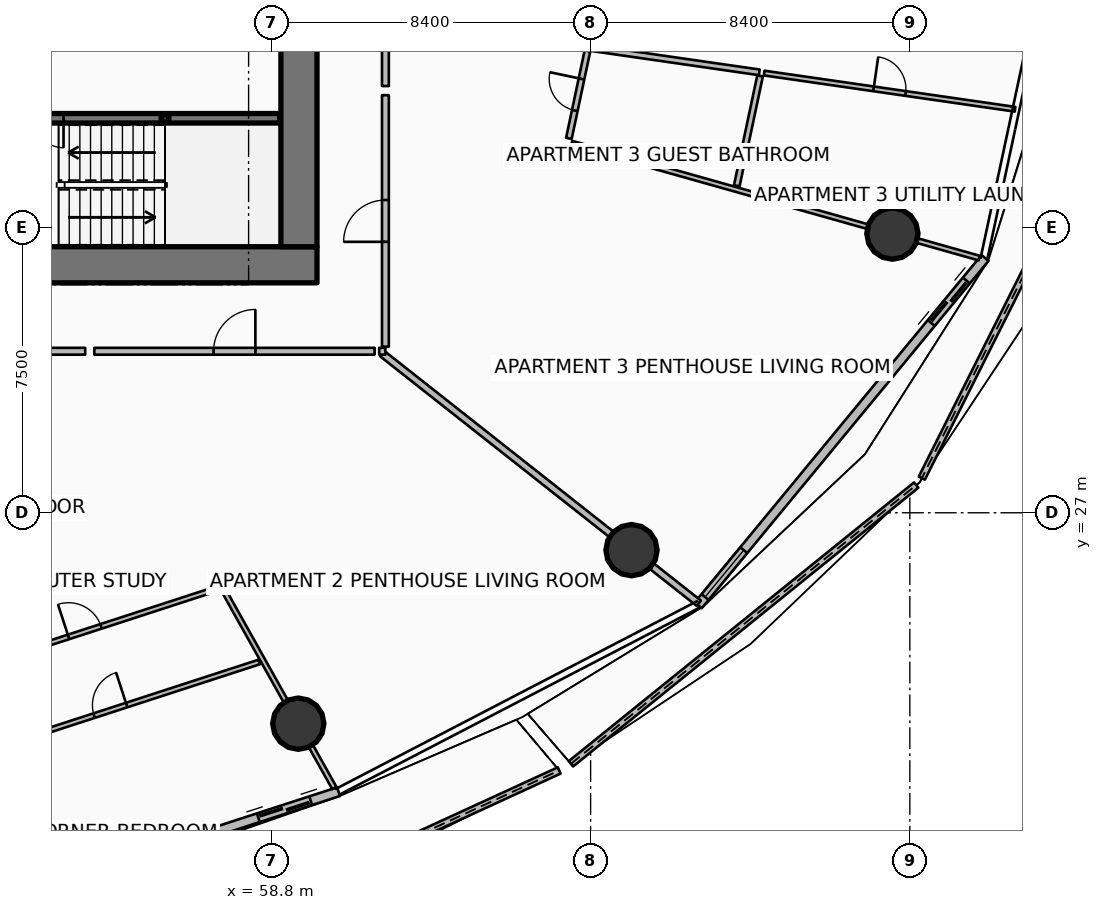
"""IFC4 building model, lengths in metres.
Left out: names, types, materials, properties, quantities, classifications, styles, units other than length and angle.
Written with IfcOpenShell. Run it as: python <this file> out.ifc"""

import sys

from ifc_helpers import new_model, si_unit, direction, frame, frame_2d, origin, origin_2d, place, context, subcontext, project, spatial, polyline, rectangle, hollow_rectangle, circle, outline, extrude, element, fill, save


model = new_model("IFC4")
c1 = context("Model", 3, precision=1e-05, world=origin(), true_north=direction((0.0, 1.0)))
c2 = subcontext(c1, "Body", "Model", "MODEL_VIEW")
j1 = project(units=[si_unit("LENGTHUNIT", "METRE"), si_unit("PLANEANGLEUNIT", "RADIAN")], contexts=[c1])
p1 = place(None, origin())
s1 = spatial("IfcSite", under=j1, at=p1, CompositionType="ELEMENT")
p2 = place(p1, origin())
s2 = spatial("IfcBuilding", under=s1, at=p2, CompositionType="ELEMENT")
p3 = place(p2, frame((0.0, 0.0, 48.9)))
s3 = spatial("IfcBuildingStorey", under=s2, at=p3, CompositionType="ELEMENT", Elevation=48.9)
p4 = place(p3, frame((49.95, 33.525, 0.0), z_axis=(0.0, 0.0, 1.0), x_axis=(1.0, 0.0, 0.0)))
e1 = element("IfcWall", 1, at=p4, inside=s3, PredefinedType="SHEAR", context=c2, shape_type="SweptSolid", body=[
    extrude(rectangle(XDim=10.05, YDim=0.95, at=frame_2d((5.025, 0.0))), origin(), (0.0, 0.0, 1.0), 3.75),
])
p5 = place(p3, frame((59.525, 34.0, 0.0), z_axis=(0.0, 0.0, 1.0), x_axis=(0.0, 1.0, 0.0)))
e2 = element("IfcWall", 2, at=p5, inside=s3, PredefinedType="SHEAR", context=c2, shape_type="SweptSolid", body=[
    extrude(rectangle(XDim=16.0, YDim=0.95, at=frame_2d((8.0, 0.0))), origin(), (0.0, 0.0, 1.0), 3.75),
])
p6 = place(p3, frame((56.0, 37.38, 0.0), z_axis=(0.0, 0.0, 1.0), x_axis=(1.0, 0.0, 0.0)))
e3 = element("IfcColumn", 3, at=p6, inside=s3, PredefinedType="COLUMN", context=c2, shape_type="SweptSolid", body=[
    extrude(hollow_rectangle(XDim=0.2, YDim=0.2, WallThickness=0.01, InnerFilletRadius=0.01, OuterFilletRadius=0.02, at=origin_2d()), origin(), (0.0, 0.0, 1.0), 1.67),
])
for number, where, z_axis, x_axis in (
    (4, (59.508, 21.45, 0.0), (0.0, 0.0, 1.0), (1.0, 0.0, 0.0)),
    (5, (68.276, 26.016, 0.0), (0.0, 0.0, 1.0), (1.0, 0.0, 0.0)),
    (6, (75.141, 34.345, 0.0), (0.0, 0.0, 1.0), (1.0, 0.0, 0.0)),
):
    element("IfcColumn", number, at=place(p3, frame(where, z_axis=z_axis, x_axis=x_axis)), inside=s3, PredefinedType="COLUMN", context=c2, shape_type="SweptSolid", body=[
        extrude(circle(Radius=0.675, at=origin_2d()), origin(), (0.0, 0.0, 1.0), 3.5),
    ])
p7 = place(p3, frame((56.653, 15.754, 0.0), z_axis=(0.0, 0.0, 1.0), x_axis=(0.908702116292, 0.417445162681, 0.0)))
e7 = element("IfcWall", 7, at=p7, inside=s3, PredefinedType="PARAPET", context=c2, shape_type="SweptSolid", body=[
    extrude(outline(polyline([(0.0, 0.0), (10.697, 0.0), (10.697, 1.233), (5.348, 1.418), (0.0, 1.632), (0.0, 0.0)])), frame((0.0, 0.09, 0.0), z_axis=(0.0, -1.0, 0.0), x_axis=(1.0, 0.0, 0.0)), (0.0, 0.0, 1.0), 0.18),
])
p8 = place(p3, frame((66.682, 20.395, 0.0), z_axis=(0.0, 0.0, 1.0), x_axis=(0.778164801363, 0.628060141961, 0.0)))
e8 = element("IfcWall", 8, at=p8, inside=s3, PredefinedType="PARAPET", context=c2, shape_type="SweptSolid", body=[
    extrude(outline(polyline([(0.0, 0.0), (11.677, 0.0), (11.677, 1.148), (5.838, 1.127), (0.0, 1.224), (0.0, 0.0)])), frame((0.0, 0.09, 0.0), z_axis=(0.0, -1.0, 0.0), x_axis=(1.0, 0.0, 0.0)), (0.0, 0.0, 1.0), 0.18),
])
p9 = place(p3, frame((75.915, 27.911, 0.0), z_axis=(0.0, 0.0, 1.0), x_axis=(0.448439969312, 0.893812952425, 0.0)))
e9 = element("IfcWall", 9, at=p9, inside=s3, PredefinedType="PARAPET", context=c2, shape_type="SweptSolid", body=[
    extrude(outline(polyline([(0.0, 0.0), (12.577, 0.0), (12.577, 1.483), (6.289, 1.284), (0.0, 1.148), (0.0, 0.0)])), frame((0.0, 0.09, 0.0), z_axis=(0.0, -1.0, 0.0), x_axis=(1.0, 0.0, 0.0)), (0.0, 0.0, 1.0), 0.18),
])
p10 = place(p3, frame((50.964, 16.542, 0.0), z_axis=(0.0, 0.0, 1.0), x_axis=(0.951054679225, 0.309022648238, 0.0)))
e10 = element("IfcWall", 10, at=p10, inside=s3, PredefinedType="SOLIDWALL", context=c2, shape_type="SweptSolid", body=[
    extrude(rectangle(XDim=10.097, YDim=0.24, at=frame_2d((5.048, 0.0))), origin(), (0.0, 0.0, 1.0), 2.45),
])
p11 = place(p10, frame((7.877, 0.0, 0.0)))
e11 = element("IfcOpeningElement", 11, at=p11, cuts=e10, PredefinedType="OPENING", context=c2, shape_type="SweptSolid", body=[
    extrude(rectangle(XDim=1.45, YDim=2.15, at=frame_2d((0.725, 1.075))), frame((0.0, 0.13, 0.0), z_axis=(0.0, -1.0, 0.0), x_axis=(1.0, 0.0, 0.0)), (0.0, 0.0, 1.0), 0.26),
])
p12 = place(p10, frame((0.28, 0.0, 0.65)))
e12 = element("IfcOpeningElement", 12, at=p12, cuts=e10, PredefinedType="OPENING", context=c2, shape_type="SweptSolid", body=[
    extrude(rectangle(XDim=1.6, YDim=1.5, at=frame_2d((0.8, 0.75))), frame((0.0, 0.13, 0.0), z_axis=(0.0, -1.0, 0.0), x_axis=(1.0, 0.0, 0.0)), (0.0, 0.0, 1.0), 0.26),
])
p13 = place(p3, frame((70.033, 24.567, 0.0), z_axis=(0.0, 0.0, 1.0), x_axis=(0.636674332663, 0.771132799281, 0.0)))
e13 = element("IfcWall", 13, at=p13, inside=s3, PredefinedType="SOLIDWALL", context=c2, shape_type="SweptSolid", body=[
    extrude(rectangle(XDim=11.851, YDim=0.24, at=frame_2d((5.926, 0.0))), origin(), (0.0, 0.0, 1.0), 2.45),
])
p14 = place(p13, frame((9.631, 0.0, 0.0)))
e14 = element("IfcOpeningElement", 14, at=p14, cuts=e13, PredefinedType="OPENING", context=c2, shape_type="SweptSolid", body=[
    extrude(rectangle(XDim=1.45, YDim=2.15, at=frame_2d((0.725, 1.075))), frame((0.0, 0.13, 0.0), z_axis=(0.0, -1.0, 0.0), x_axis=(1.0, 0.0, 0.0)), (0.0, 0.0, 1.0), 0.26),
])
p15 = place(p13, frame((0.28, 0.0, 0.65)))
e15 = element("IfcOpeningElement", 15, at=p15, cuts=e13, PredefinedType="OPENING", context=c2, shape_type="SweptSolid", body=[
    extrude(rectangle(XDim=1.6, YDim=1.5, at=frame_2d((0.8, 0.75))), frame((0.0, 0.13, 0.0), z_axis=(0.0, -1.0, 0.0), x_axis=(1.0, 0.0, 0.0)), (0.0, 0.0, 1.0), 0.26),
])
p16 = place(p3, frame((51.48, 37.38, 0.0), z_axis=(0.0, 0.0, 1.0), x_axis=(1.0, 0.0, 0.0)))
e16 = element("IfcWall", 16, at=p16, inside=s3, PredefinedType="SOLIDWALL", context=c2, shape_type="SweptSolid", body=[
    extrude(rectangle(XDim=7.54, YDim=0.25, at=frame_2d((3.77, 0.0))), origin(), (0.0, 0.0, 1.0), 3.5),
])
p17 = place(p16, frame((0.3, 0.0, 0.0)))
e17 = element("IfcOpeningElement", 17, at=p17, cuts=e16, PredefinedType="OPENING", context=c2, shape_type="SweptSolid", body=[
    extrude(rectangle(XDim=1.55, YDim=2.15, at=frame_2d((0.775, 1.075))), frame((0.0, 0.135, 0.0), z_axis=(0.0, -1.0, 0.0), x_axis=(1.0, 0.0, 0.0)), (0.0, 0.0, 1.0), 0.27),
])
p18 = place(p3, frame((61.723, 31.182, 0.0), z_axis=(0.0, 0.0, 1.0), x_axis=(0.785321288316, -0.619088421889, 0.0)))
e18 = element("IfcWall", 18, at=p18, inside=s3, PredefinedType="PARTITIONING", context=c2, shape_type="SweptSolid", body=[
    extrude(rectangle(XDim=10.598, YDim=0.18, at=frame_2d((5.299, 0.0))), origin(), (0.0, 0.0, 1.0), 2.867),
])
p19 = place(p3, frame((54.14, 31.25, 0.0), z_axis=(0.0, 0.0, 1.0), x_axis=(1.0, 0.0, 0.0)))
e19 = element("IfcWall", 19, at=p19, inside=s3, PredefinedType="PARTITIONING", context=c2, shape_type="SweptSolid", body=[
    extrude(rectangle(XDim=7.376, YDim=0.18, at=frame_2d((3.688, 0.0))), origin(), (0.0, 0.0, 1.0), 2.867),
])
p20 = place(p19, frame((3.138, 0.0, 0.0)))
e20 = element("IfcOpeningElement", 20, at=p20, cuts=e19, PredefinedType="OPENING", context=c2, shape_type="SweptSolid", body=[
    extrude(rectangle(XDim=1.1, YDim=2.1, at=frame_2d((0.55, 1.05))), frame((0.0, 0.1, 0.0), z_axis=(0.0, -1.0, 0.0), x_axis=(1.0, 0.0, 0.0)), (0.0, 0.0, 1.0), 0.2),
])
p21 = place(p3, frame((49.392, 31.25, 0.0), z_axis=(0.0, 0.0, 1.0), x_axis=(1.0, 0.0, 0.0)))
e21 = element("IfcWall", 21, at=p21, inside=s3, PredefinedType="PARTITIONING", context=c2, shape_type="SweptSolid", body=[
    extrude(rectangle(XDim=4.508, YDim=0.18, at=frame_2d((2.254, 0.0))), origin(), (0.0, 0.0, 1.0), 2.867),
])
p22 = place(p3, frame((57.545, 24.957, 0.0), z_axis=(0.0, 0.0, 1.0), x_axis=(0.488592145891, -0.872512300758, 0.0)))
e22 = element("IfcWall", 22, at=p22, inside=s3, PredefinedType="PARTITIONING", context=c2, shape_type="SweptSolid", body=[
    extrude(rectangle(XDim=5.962, YDim=0.125, at=frame_2d((2.981, 0.0))), origin(), (0.0, 0.0, 1.0), 2.867),
])
p23 = place(p3, frame((50.389, 22.735, 0.0), z_axis=(0.0, 0.0, 1.0), x_axis=(0.951050149939, 0.309036587317, 0.0)))
e23 = element("IfcWall", 23, at=p23, inside=s3, PredefinedType="PARTITIONING", context=c2, shape_type="SweptSolid", body=[
    extrude(rectangle(XDim=7.363, YDim=0.125, at=frame_2d((3.681, 0.0))), origin(), (0.0, 0.0, 1.0), 2.867),
])
p24 = place(p23, frame((3.231, 0.0, 0.0)))
e24 = element("IfcOpeningElement", 24, at=p24, cuts=e23, PredefinedType="OPENING", context=c2, shape_type="SweptSolid", body=[
    extrude(rectangle(XDim=0.9, YDim=2.08, at=frame_2d((0.45, 1.04))), frame((0.0, 0.073, 0.0), z_axis=(0.0, -1.0, 0.0), x_axis=(1.0, 0.0, 0.0)), (0.0, 0.0, 1.0), 0.145),
])
p25 = place(p3, frame((50.65, 20.53, 0.0), z_axis=(0.0, 0.0, 1.0), x_axis=(0.951053253308, 0.309027036638, 0.0)))
e25 = element("IfcWall", 25, at=p25, inside=s3, PredefinedType="PARTITIONING", context=c2, shape_type="SweptSolid", body=[
    extrude(rectangle(XDim=8.229, YDim=0.125, at=frame_2d((4.115, 0.0))), origin(), (0.0, 0.0, 1.0), 2.867),
])
p26 = place(p25, frame((3.665, 0.0, 0.0)))
e26 = element("IfcOpeningElement", 26, at=p26, cuts=e25, PredefinedType="OPENING", context=c2, shape_type="SweptSolid", body=[
    extrude(rectangle(XDim=0.9, YDim=2.08, at=frame_2d((0.45, 1.04))), frame((0.0, 0.073, 0.0), z_axis=(0.0, -1.0, 0.0), x_axis=(1.0, 0.0, 0.0)), (0.0, 0.0, 1.0), 0.145),
])
p27 = place(p3, frame((61.636, 31.25, 0.0), z_axis=(0.0, 0.0, 1.0), x_axis=(1.0, 0.0, 0.0)))
e27 = element("IfcWall", 27, at=p27, inside=s3, PredefinedType="PARTITIONING", context=c2, shape_type="SweptSolid", body=[
    extrude(rectangle(XDim=0.164, YDim=0.18, at=frame_2d((0.082, 0.0))), origin(), (0.0, 0.0, 1.0), 2.867),
])
p28 = place(p3, frame((61.8, 31.37, 0.0), z_axis=(0.0, 0.0, 1.0), x_axis=(0.0, 1.0, 0.0)))
e28 = element("IfcWall", 28, at=p28, inside=s3, PredefinedType="PARTITIONING", context=c2, shape_type="SweptSolid", body=[
    extrude(rectangle(XDim=6.618, YDim=0.18, at=frame_2d((3.309, 0.0))), origin(), (0.0, 0.0, 1.0), 2.867),
])
p29 = place(p28, frame((2.759, 0.0, 0.0)))
e29 = element("IfcOpeningElement", 29, at=p29, cuts=e28, PredefinedType="OPENING", context=c2, shape_type="SweptSolid", body=[
    extrude(rectangle(XDim=1.1, YDim=2.1, at=frame_2d((0.55, 1.05))), frame((0.0, 0.1, 0.0), z_axis=(0.0, -1.0, 0.0), x_axis=(1.0, 0.0, 0.0)), (0.0, 0.0, 1.0), 0.2),
])
p30 = place(p3, frame((61.8, 38.228, 0.0), z_axis=(0.0, 0.0, 1.0), x_axis=(0.0, 1.0, 0.0)))
e30 = element("IfcWall", 30, at=p30, inside=s3, PredefinedType="PARTITIONING", context=c2, shape_type="SweptSolid", body=[
    extrude(rectangle(XDim=5.285, YDim=0.18, at=frame_2d((2.643, 0.0))), origin(), (0.0, 0.0, 1.0), 2.867),
])
p31 = place(p3, frame((66.703, 36.725, 0.0), z_axis=(0.0, 0.0, 1.0), x_axis=(0.962456868727, -0.271434662195, 0.0)))
e31 = element("IfcWall", 31, at=p31, inside=s3, PredefinedType="PARTITIONING", context=c2, shape_type="SweptSolid", body=[
    extrude(rectangle(XDim=11.141, YDim=0.125, at=frame_2d((5.571, 0.0))), origin(), (0.0, 0.0, 1.0), 2.867),
])
p32 = place(p3, frame((66.628, 36.85, 0.0), z_axis=(0.0, 0.0, 1.0), x_axis=(0.207543347309, 0.978225822082, 0.0)))
e32 = element("IfcWall", 32, at=p32, inside=s3, PredefinedType="PARTITIONING", context=c2, shape_type="SweptSolid", body=[
    extrude(rectangle(XDim=2.352, YDim=0.15, at=frame_2d((1.176, 0.0))), origin(), (0.0, 0.0, 1.0), 2.867),
])
p33 = place(p32, frame((0.751, 0.0, 0.0)))
e33 = element("IfcOpeningElement", 33, at=p33, cuts=e32, PredefinedType="OPENING", context=c2, shape_type="SweptSolid", body=[
    extrude(rectangle(XDim=0.85, YDim=2.06, at=frame_2d((0.425, 1.03))), frame((0.0, 0.085, 0.0), z_axis=(0.0, -1.0, 0.0), x_axis=(1.0, 0.0, 0.0)), (0.0, 0.0, 1.0), 0.17),
])
p34 = place(p3, frame((71.046, 35.604, 0.0), z_axis=(0.0, 0.0, 1.0), x_axis=(0.207542541756, 0.97822599299, 0.0)))
e34 = element("IfcWall", 34, at=p34, inside=s3, PredefinedType="PARTITIONING", context=c2, shape_type="SweptSolid", body=[
    extrude(rectangle(XDim=2.955, YDim=0.15, at=frame_2d((1.478, 0.0))), origin(), (0.0, 0.0, 1.0), 2.867),
])
p35 = place(p3, frame((67.224, 39.226, 0.0), z_axis=(0.0, 0.0, 1.0), x_axis=(0.989741519473, -0.142869607092, 0.0)))
e35 = element("IfcWall", 35, at=p35, inside=s3, PredefinedType="PARTITIONING", context=c2, shape_type="SweptSolid", body=[
    extrude(rectangle(XDim=4.46, YDim=0.15, at=frame_2d((2.23, 0.0))), origin(), (0.0, 0.0, 1.0), 2.94),
])
p36 = place(p3, frame((71.767, 38.57, 0.0), z_axis=(0.0, 0.0, 1.0), x_axis=(0.989747166196, -0.142830483468, 0.0)))
e36 = element("IfcWall", 36, at=p36, inside=s3, PredefinedType="PARTITIONING", context=c2, shape_type="SweptSolid", body=[
    extrude(rectangle(XDim=6.67, YDim=0.125, at=frame_2d((3.335, 0.0))), origin(), (0.0, 0.0, 1.0), 2.94),
])
p37 = place(p36, frame((2.91, 0.0, 0.0)))
e37 = element("IfcOpeningElement", 37, at=p37, cuts=e36, PredefinedType="OPENING", context=c2, shape_type="SweptSolid", body=[
    extrude(rectangle(XDim=0.85, YDim=2.06, at=frame_2d((0.425, 1.03))), frame((0.0, 0.073, 0.0), z_axis=(0.0, -1.0, 0.0), x_axis=(1.0, 0.0, 0.0)), (0.0, 0.0, 1.0), 0.145),
])
p38 = place(p11, origin())
e38 = element("IfcDoor", 38, at=p38, inside=s3, OperationType="DOUBLE_DOOR_SLIDING", PredefinedType="DOOR", context=c2, shape_type="SweptSolid", body=[
    extrude(rectangle(XDim=1.45, YDim=2.15, at=frame_2d((0.725, 1.075))), frame((0.0, 0.025, 0.0), z_axis=(0.0, -1.0, 0.0), x_axis=(1.0, 0.0, 0.0)), (0.0, 0.0, 1.0), 0.05),
])
fill(e11, e38)
p39 = place(p14, origin())
e39 = element("IfcDoor", 39, at=p39, inside=s3, OperationType="DOUBLE_DOOR_SLIDING", PredefinedType="DOOR", context=c2, shape_type="SweptSolid", body=[
    extrude(rectangle(XDim=1.45, YDim=2.15, at=frame_2d((0.725, 1.075))), frame((0.0, 0.025, 0.0), z_axis=(0.0, -1.0, 0.0), x_axis=(1.0, 0.0, 0.0)), (0.0, 0.0, 1.0), 0.05),
])
fill(e14, e39)
p40 = place(p15, origin())
e40 = element("IfcWindow", 40, at=p40, inside=s3, PartitioningType="SINGLE_PANEL", PredefinedType="WINDOW", context=c2, shape_type="SweptSolid", body=[
    extrude(rectangle(XDim=1.6, YDim=1.5, at=frame_2d((0.8, 0.75))), frame((0.0, 0.03, 0.0), z_axis=(0.0, -1.0, 0.0), x_axis=(1.0, 0.0, 0.0)), (0.0, 0.0, 1.0), 0.06),
])
fill(e15, e40)
p41 = place(p17, origin())
e41 = element("IfcDoor", 41, at=p41, inside=s3, OperationType="DOUBLE_DOOR_SINGLE_SWING", PredefinedType="DOOR", context=c2, shape_type="SweptSolid", body=[
    extrude(rectangle(XDim=1.55, YDim=2.15, at=frame_2d((0.775, 1.075))), frame((0.0, 0.025, 0.0), z_axis=(0.0, -1.0, 0.0), x_axis=(1.0, 0.0, 0.0)), (0.0, 0.0, 1.0), 0.05),
])
fill(e17, e41)
p42 = place(p20, origin())
e42 = element("IfcDoor", 42, at=p42, inside=s3, OperationType="SINGLE_SWING_RIGHT", PredefinedType="DOOR", context=c2, shape_type="SweptSolid", body=[
    extrude(rectangle(XDim=1.1, YDim=2.1, at=frame_2d((0.55, 1.05))), frame((0.0, 0.025, 0.0), z_axis=(0.0, -1.0, 0.0), x_axis=(1.0, 0.0, 0.0)), (0.0, 0.0, 1.0), 0.05),
])
fill(e20, e42)
p43 = place(p24, origin())
e43 = element("IfcDoor", 43, at=p43, inside=s3, OperationType="SINGLE_SWING_LEFT", PredefinedType="DOOR", context=c2, shape_type="SweptSolid", body=[
    extrude(rectangle(XDim=0.9, YDim=2.08, at=frame_2d((0.45, 1.04))), frame((0.0, 0.025, 0.0), z_axis=(0.0, -1.0, 0.0), x_axis=(1.0, 0.0, 0.0)), (0.0, 0.0, 1.0), 0.05),
])
fill(e24, e43)
p44 = place(p26, origin())
e44 = element("IfcDoor", 44, at=p44, inside=s3, OperationType="SINGLE_SWING_RIGHT", PredefinedType="DOOR", context=c2, shape_type="SweptSolid", body=[
    extrude(rectangle(XDim=0.9, YDim=2.08, at=frame_2d((0.45, 1.04))), frame((0.0, 0.025, 0.0), z_axis=(0.0, -1.0, 0.0), x_axis=(1.0, 0.0, 0.0)), (0.0, 0.0, 1.0), 0.05),
])
fill(e26, e44)
p45 = place(p29, origin())
e45 = element("IfcDoor", 45, at=p45, inside=s3, OperationType="SINGLE_SWING_LEFT", PredefinedType="DOOR", context=c2, shape_type="SweptSolid", body=[
    extrude(rectangle(XDim=1.1, YDim=2.1, at=frame_2d((0.55, 1.05))), frame((0.0, 0.025, 0.0), z_axis=(0.0, -1.0, 0.0), x_axis=(1.0, 0.0, 0.0)), (0.0, 0.0, 1.0), 0.05),
])
fill(e29, e45)
p46 = place(p33, origin())
e46 = element("IfcDoor", 46, at=p46, inside=s3, OperationType="SINGLE_SWING_RIGHT", PredefinedType="DOOR", context=c2, shape_type="SweptSolid", body=[
    extrude(rectangle(XDim=0.85, YDim=2.06, at=frame_2d((0.425, 1.03))), frame((0.0, 0.025, 0.0), z_axis=(0.0, -1.0, 0.0), x_axis=(1.0, 0.0, 0.0)), (0.0, 0.0, 1.0), 0.05),
])
fill(e33, e46)
p47 = place(p37, origin())
e47 = element("IfcDoor", 47, at=p47, inside=s3, OperationType="SINGLE_SWING_LEFT", PredefinedType="DOOR", context=c2, shape_type="SweptSolid", body=[
    extrude(rectangle(XDim=0.85, YDim=2.06, at=frame_2d((0.425, 1.03))), frame((0.0, 0.025, 0.0), z_axis=(0.0, -1.0, 0.0), x_axis=(1.0, 0.0, 0.0)), (0.0, 0.0, 1.0), 0.05),
])
fill(e37, e47)
save(model, sys.argv[1])
